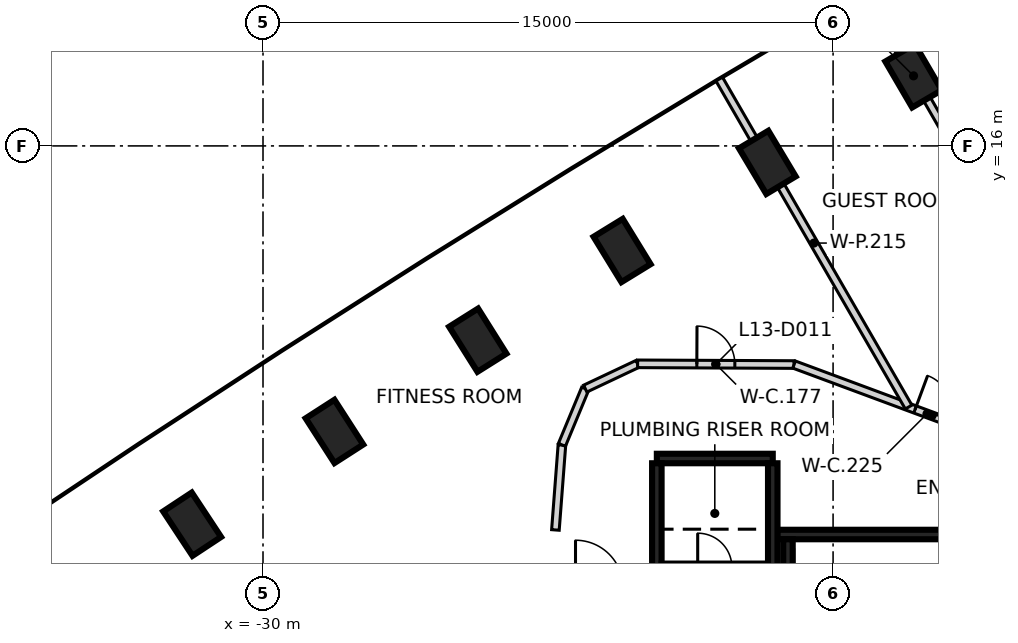
"""IFC4 building model, lengths in metres.
Left out: names, types, materials, properties, quantities, classifications, styles, units other than length and angle.
Written with IfcOpenShell. Run it as: python <this file> out.ifc"""

import sys

from ifc_helpers import new_model, si_unit, direction, frame, frame_2d, origin, origin_2d, place, context, subcontext, project, spatial, rectangle, extrude, element, fill, save


model = new_model("IFC4")
c1 = context("Model", 3, precision=1e-05, world=origin(), true_north=direction((0.0, 1.0)))
c2 = subcontext(c1, "Body", "Model", "MODEL_VIEW")
j1 = project(units=[si_unit("LENGTHUNIT", "METRE"), si_unit("PLANEANGLEUNIT", "RADIAN")], contexts=[c1])
p1 = place(None, origin())
s1 = spatial("IfcSite", under=j1, at=p1, CompositionType="ELEMENT")
p2 = place(p1, origin())
s2 = spatial("IfcBuilding", under=s1, at=p2, CompositionType="ELEMENT")
p3 = place(p2, frame((0.0, 0.0, 60.2)))
s3 = spatial("IfcBuildingStorey", under=s2, at=p3, CompositionType="ELEMENT", Elevation=60.2)
for number, where, z_axis, x_axis in (
    (1, (-12.883, 17.844, -0.475), (0.0, 0.0, 1.0), (-0.505, 0.863, 0.0)),
    (2, (-16.73, 15.566, -0.475), (0.0, 0.0, 1.0), (-0.514, 0.858, 0.0)),
    (3, (-20.552, 13.248, -0.475), (0.0, 0.0, 1.0), (-0.523, 0.852, 0.0)),
    (4, (-24.349, 10.888, -0.475), (0.0, 0.0, 1.0), (-0.532, 0.846, 0.0)),
    (5, (-28.12, 8.488, -0.475), (0.0, 0.0, 1.0), (-0.541, 0.841, 0.0)),
    (6, (-31.865, 6.046, -0.475), (0.0, 0.0, 1.0), (-0.551, 0.835, 0.0)),
):
    element("IfcColumn", number, at=place(p3, frame(where, z_axis=z_axis, x_axis=x_axis)), inside=s3, PredefinedType="COLUMN", context=c2, shape_type="SweptSolid", body=[
        extrude(rectangle(XDim=1.4, YDim=0.9, at=origin_2d()), origin(), (0.0, 0.0, 1.0), 3.6),
    ])
p4 = place(p3, frame((-16.472, 5.775, 0.0), z_axis=(0.0, 0.0, 1.0), x_axis=(1.0, 0.0, 0.0)))
e7 = element("IfcWall", 7, at=p4, inside=s3, PredefinedType="SHEAR", context=c2, shape_type="SweptSolid", body=[
    extrude(rectangle(XDim=5.51, YDim=0.25, at=frame_2d((2.755, 0.0))), origin(), (0.0, 0.0, 1.0), 3.125),
])
p5 = place(p3, frame((-19.637, 7.775, 0.0), z_axis=(0.0, 0.0, 1.0), x_axis=(1.0, 0.0, 0.0)))
e8 = element("IfcWall", 8, at=p5, inside=s3, PredefinedType="SHEAR", context=c2, shape_type="SweptSolid", body=[
    extrude(rectangle(XDim=3.05, YDim=0.25, at=frame_2d((1.525, 0.0))), origin(), (0.0, 0.0, 1.0), 3.125),
])
for number, where, z_axis, x_axis in (
    (9, (-16.587, 7.65, 0.0), (0.0, 0.0, 1.0), (0.0, -1.0, 0.0)),
    (10, (-19.637, 4.785, 0.0), (0.0, 0.0, 1.0), (0.0, 1.0, 0.0)),
):
    element("IfcWall", number, at=place(p3, frame(where, z_axis=z_axis, x_axis=x_axis)), inside=s3, PredefinedType="SHEAR", context=c2, shape_type="SweptSolid", body=[
        extrude(rectangle(XDim=2.865, YDim=0.25, at=frame_2d((1.432, 0.0))), origin(), (0.0, 0.0, 1.0), 3.125),
    ])
p6 = place(p3, frame((-16.187, 3.2, 0.0), z_axis=(0.0, 0.0, 1.0), x_axis=(0.0, 1.0, 0.0)))
e11 = element("IfcWall", 11, at=p6, inside=s3, PredefinedType="SHEAR", context=c2, shape_type="SweptSolid", body=[
    extrude(rectangle(XDim=2.449, YDim=0.25, at=frame_2d((1.225, 0.0))), origin(), (0.0, 0.0, 1.0), 3.125),
])
p7 = place(p3, frame((-22.306, 5.895, 0.0), z_axis=(0.0, 0.0, 1.0), x_axis=(0.076246699626, 0.997088983389, 0.0)))
e12 = element("IfcWall", 12, at=p7, inside=s3, PredefinedType="PARTITIONING", context=c2, shape_type="SweptSolid", body=[
    extrude(rectangle(XDim=2.241, YDim=0.2, at=frame_2d((1.121, 0.0))), origin(), (0.0, 0.0, 1.0), 3.125),
])
p8 = place(p3, frame((-22.135, 8.134, 0.0), z_axis=(0.0, 0.0, 1.0), x_axis=(0.383208453534, 0.923661886807, 0.0)))
e13 = element("IfcWall", 13, at=p8, inside=s3, PredefinedType="PARTITIONING", context=c2, shape_type="SweptSolid", body=[
    extrude(rectangle(XDim=1.602, YDim=0.2, at=frame_2d((0.801, 0.0))), origin(), (0.0, 0.0, 1.0), 3.125),
])
p9 = place(p3, frame((-21.521, 9.614, 0.0), z_axis=(0.0, 0.0, 1.0), x_axis=(0.904083527367, 0.427355795028, 0.0)))
e14 = element("IfcWall", 14, at=p9, inside=s3, PredefinedType="PARTITIONING", context=c2, shape_type="SweptSolid", body=[
    extrude(rectangle(XDim=1.523, YDim=0.2, at=frame_2d((0.761, 0.0))), origin(), (0.0, 0.0, 1.0), 3.125),
])
p10 = place(p3, frame((-20.143, 10.266, 0.0), z_axis=(0.0, 0.0, 1.0), x_axis=(0.999989297417, -0.004626559416, 0.0)))
e15 = element("IfcWall", 15, at=p10, inside=s3, PredefinedType="PARTITIONING", context=c2, shape_type="SweptSolid", body=[
    extrude(rectangle(XDim=4.116, YDim=0.2, at=frame_2d((2.058, 0.0))), origin(), (0.0, 0.0, 1.0), 3.125),
])
p11 = place(p10, frame((1.558, 0.0, 0.0)))
e16 = element("IfcOpeningElement", 16, at=p11, cuts=e15, PredefinedType="OPENING", context=c2, shape_type="SweptSolid", body=[
    extrude(rectangle(XDim=1.0, YDim=2.1, at=frame_2d((0.5, 1.05))), frame((0.0, 0.11, 0.0), z_axis=(0.0, -1.0, 0.0), x_axis=(1.0, 0.0, 0.0)), (0.0, 0.0, 1.0), 0.22),
])
p12 = place(p3, frame((-16.026, 10.247, 0.0), z_axis=(0.0, 0.0, 1.0), x_axis=(0.937540909117, -0.347875040397, 0.0)))
e17 = element("IfcWall", 17, at=p12, inside=s3, PredefinedType="PARTITIONING", context=c2, shape_type="SweptSolid", body=[
    extrude(rectangle(XDim=7.459, YDim=0.2, at=frame_2d((3.729, 0.0))), origin(), (0.0, 0.0, 1.0), 3.125),
])
p13 = place(p12, frame((3.396, 0.0, 0.0)))
e18 = element("IfcOpeningElement", 18, at=p13, cuts=e17, PredefinedType="OPENING", context=c2, shape_type="SweptSolid", body=[
    extrude(rectangle(XDim=0.95, YDim=2.1, at=frame_2d((0.475, 1.05))), frame((0.0, 0.11, 0.0), z_axis=(0.0, -1.0, 0.0), x_axis=(1.0, 0.0, 0.0)), (0.0, 0.0, 1.0), 0.22),
])
p14 = place(p3, frame((-17.996, 17.758, 0.0), z_axis=(0.0, 0.0, 1.0), x_axis=(0.500046945013, -0.865998298372, 0.0)))
e19 = element("IfcWall", 19, at=p14, inside=s3, PredefinedType="PARTITIONING", context=c2, shape_type="SweptSolid", body=[
    extrude(rectangle(XDim=9.964, YDim=0.2, at=frame_2d((4.982, 0.0))), origin(), (0.0, 0.0, 1.0), 3.125),
])
p15 = place(p3, frame((-14.149, 20.035, 0.0), z_axis=(0.0, 0.0, 1.0), x_axis=(0.500022967158, -0.866012143284, 0.0)))
e20 = element("IfcWall", 20, at=p15, inside=s3, PredefinedType="PARTITIONING", context=c2, shape_type="SweptSolid", body=[
    extrude(rectangle(XDim=11.838, YDim=0.2, at=frame_2d((5.919, 0.0))), origin(), (0.0, 0.0, 1.0), 3.125),
])
p16 = place(p13, origin())
e21 = element("IfcDoor", 21, at=p16, inside=s3, OperationType="SINGLE_SWING_LEFT", PredefinedType="DOOR", context=c2, shape_type="SweptSolid", body=[
    extrude(rectangle(XDim=0.95, YDim=2.1, at=frame_2d((0.475, 1.05))), frame((0.0, 0.025, 0.0), z_axis=(0.0, -1.0, 0.0), x_axis=(1.0, 0.0, 0.0)), (0.0, 0.0, 1.0), 0.05),
])
fill(e18, e21)
p17 = place(p11, origin())
e22 = element("IfcDoor", 22, at=p17, inside=s3, OperationType="SINGLE_SWING_LEFT", PredefinedType="DOOR", context=c2, shape_type="SweptSolid", body=[
    extrude(rectangle(XDim=1.0, YDim=2.1, at=frame_2d((0.5, 1.05))), frame((0.0, 0.025, 0.0), z_axis=(0.0, -1.0, 0.0), x_axis=(1.0, 0.0, 0.0)), (0.0, 0.0, 1.0), 0.05),
])
fill(e16, e22)
save(model, sys.argv[1])
